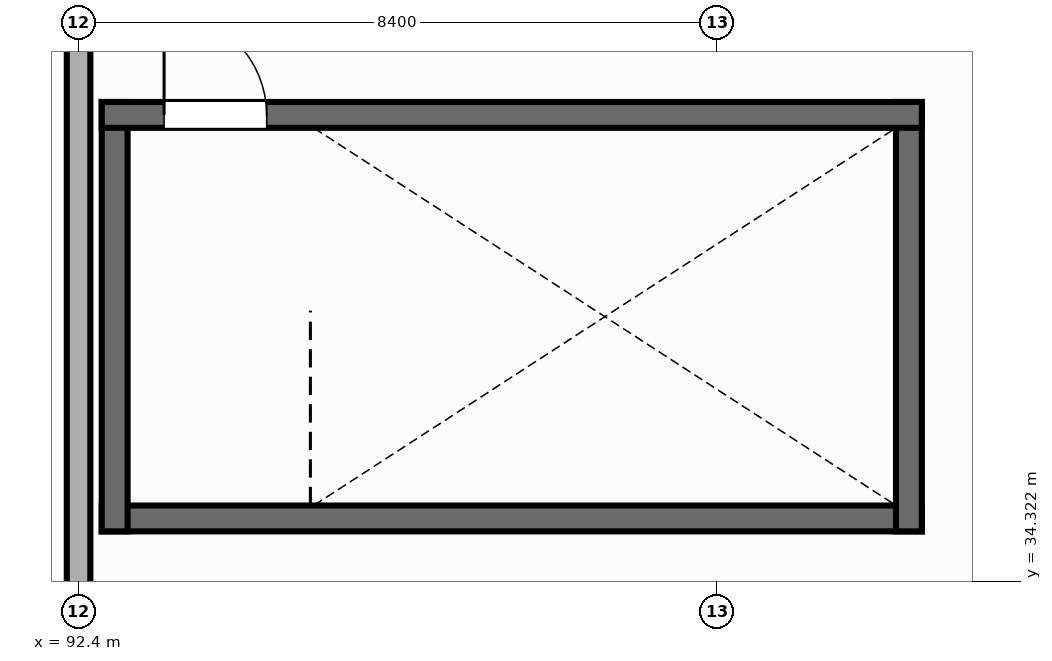
"""IFC4 building model, lengths in metres.
Left out: names, types, materials, properties, quantities, classifications, styles, units other than length and angle.
Written with IfcOpenShell. Run it as: python <this file> out.ifc"""

import sys

from ifc_helpers import new_model, si_unit, direction, frame, frame_2d, origin, place, context, subcontext, project, spatial, rectangle, extrude, element, fill, save


model = new_model("IFC4")
c1 = context("Model", 3, precision=1e-05, world=origin(), true_north=direction((0.0, 1.0)))
c2 = subcontext(c1, "Body", "Model", "MODEL_VIEW")
j1 = project(units=[si_unit("LENGTHUNIT", "METRE"), si_unit("PLANEANGLEUNIT", "RADIAN")], contexts=[c1])
p1 = place(None, origin())
s1 = spatial("IfcSite", under=j1, at=p1, CompositionType="ELEMENT")
p2 = place(p1, origin())
s2 = spatial("IfcBuilding", under=s1, at=p2, CompositionType="ELEMENT")
p3 = place(p2, frame((0.0, 0.0, 9.9)))
s3 = spatial("IfcBuildingStorey", under=s2, at=p3, CompositionType="ELEMENT", Elevation=9.9)
p4 = place(p3, frame((92.4, 41.729, 0.0), z_axis=(0.0, 0.0, 1.0), x_axis=(0.0, -1.0, 0.0)))
e1 = element("IfcWall", 1, at=p4, inside=s3, PredefinedType="STANDARD", context=c2, shape_type="SweptSolid", body=[
    extrude(rectangle(XDim=7.858, YDim=0.31, at=frame_2d((3.929, 0.0))), origin(), (0.0, 0.0, 1.0), 3.562),
])
p5 = place(p3, frame((92.705, 35.145, 0.0), z_axis=(0.0, 0.0, 1.0), x_axis=(1.0, 0.0, 0.0)))
e2 = element("IfcWall", 2, at=p5, inside=s3, PredefinedType="SHEAR", context=c2, shape_type="SweptSolid", body=[
    extrude(rectangle(XDim=10.79, YDim=0.34, at=frame_2d((5.395, 0.0))), origin(), (0.0, 0.0, 1.0), 3.84),
])
for number, where, z_axis, x_axis in (
    (3, (92.875, 34.975, 0.0), (0.0, 0.0, 1.0), (0.0, 1.0, 0.0)),
    (4, (103.325, 34.975, 0.0), (0.0, 0.0, 1.0), (0.0, 1.0, 0.0)),
):
    element("IfcWall", number, at=place(p3, frame(where, z_axis=z_axis, x_axis=x_axis)), inside=s3, PredefinedType="SHEAR", context=c2, shape_type="SweptSolid", body=[
        extrude(rectangle(XDim=5.65, YDim=0.34, at=frame_2d((2.825, 0.0))), origin(), (0.0, 0.0, 1.0), 3.84),
    ])
p6 = place(p3, frame((92.705, 40.455, 0.0), z_axis=(0.0, 0.0, 1.0), x_axis=(1.0, 0.0, 0.0)))
e5 = element("IfcWall", 5, at=p6, inside=s3, PredefinedType="SHEAR", context=c2, shape_type="SweptSolid", body=[
    extrude(rectangle(XDim=10.79, YDim=0.34, at=frame_2d((5.395, 0.0))), origin(), (0.0, 0.0, 1.0), 3.84),
])
p7 = place(p6, frame((0.82, 0.0, 0.0)))
e6 = element("IfcOpeningElement", 6, at=p7, cuts=e5, PredefinedType="OPENING", context=c2, shape_type="SweptSolid", body=[
    extrude(rectangle(XDim=1.35, YDim=2.2, at=frame_2d((0.675, 1.1))), frame((0.0, 0.18, 0.0), z_axis=(0.0, -1.0, 0.0), x_axis=(1.0, 0.0, 0.0)), (0.0, 0.0, 1.0), 0.36),
])
p8 = place(p7, origin())
e7 = element("IfcDoor", 7, at=p8, inside=s3, OperationType="SINGLE_SWING_LEFT", PredefinedType="DOOR", context=c2, shape_type="SweptSolid", body=[
    extrude(rectangle(XDim=1.35, YDim=2.2, at=frame_2d((0.675, 1.1))), frame((0.0, 0.025, 0.0), z_axis=(0.0, -1.0, 0.0), x_axis=(1.0, 0.0, 0.0)), (0.0, 0.0, 1.0), 0.05),
])
fill(e6, e7)
save(model, sys.argv[1])
